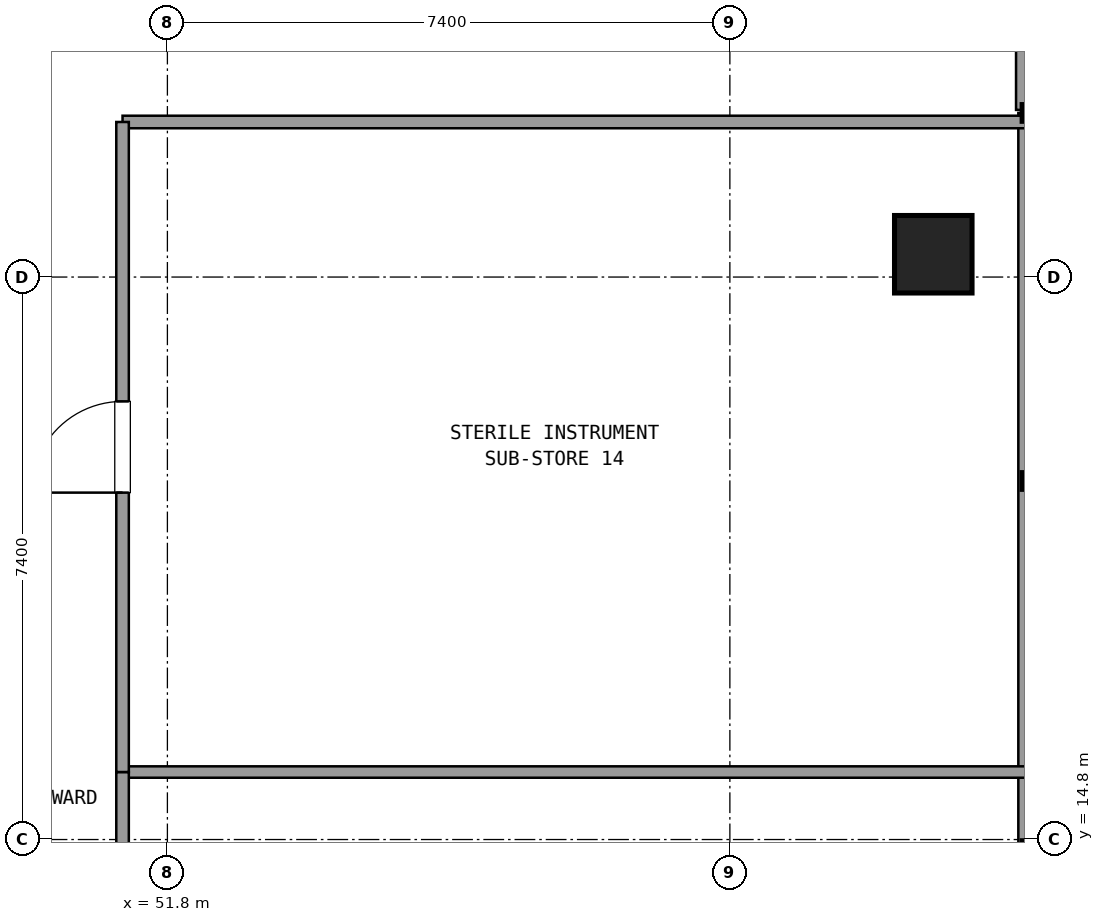
"""IFC4 building model, lengths in metres.
Left out: names, types, materials, properties, quantities, classifications, styles, units other than length and angle.
Written with IfcOpenShell. Run it as: python <this file> out.ifc"""

import sys

from ifc_helpers import new_model, si_unit, direction, frame, frame_2d, origin, origin_2d, place, context, subcontext, project, spatial, rectangle, extrude, element, fill, save


model = new_model("IFC4")
c1 = context("Model", 3, precision=1e-05, world=origin(), true_north=direction((0.0, 1.0)))
c2 = subcontext(c1, "Body", "Model", "MODEL_VIEW")
j1 = project(units=[si_unit("LENGTHUNIT", "METRE"), si_unit("PLANEANGLEUNIT", "RADIAN")], contexts=[c1])
p1 = place(None, origin())
s1 = spatial("IfcSite", under=j1, at=p1, CompositionType="ELEMENT")
p2 = place(p1, origin())
s2 = spatial("IfcBuilding", under=s1, at=p2, CompositionType="ELEMENT")
p3 = place(p2, frame((0.0, 0.0, 95.58)))
s3 = spatial("IfcBuildingStorey", under=s2, at=p3, CompositionType="ELEMENT", Elevation=95.58)
p4 = place(p3, frame((61.876, 22.5, 0.021), z_axis=(-0.084850379912, 0.0, 0.996393703828), x_axis=(0.0, -1.0, 0.0)))
e1 = element("IfcColumn", 1, at=p4, inside=s3, PredefinedType="COLUMN", context=c2, shape_type="SweptSolid", body=[
    extrude(rectangle(XDim=1.02, YDim=1.02, at=origin_2d()), origin(), (0.0, 0.0, 1.0), 3.571),
])
p5 = place(p3, frame((63.115, 24.399, 0.0), z_axis=(0.0, 0.0, 1.0), x_axis=(0.0, 1.0, 0.0)))
e2 = element("IfcWall", 2, at=p5, inside=s3, PredefinedType="SOLIDWALL", context=c2, shape_type="SweptSolid", body=[
    extrude(rectangle(XDim=3.0, YDim=0.3, at=frame_2d((1.5, 0.0))), origin(), (0.0, 0.0, 1.0), 2.67),
])
p6 = place(p5, frame((0.9, 0.0, 0.0)))
e3 = element("IfcOpeningElement", 3, at=p6, cuts=e2, PredefinedType="OPENING", context=c2, shape_type="SweptSolid", body=[
    extrude(rectangle(XDim=1.2, YDim=2.2, at=frame_2d((0.6, 1.1))), frame((0.0, 0.16, 0.0), z_axis=(0.0, -1.0, 0.0), x_axis=(1.0, 0.0, 0.0)), (0.0, 0.0, 1.0), 0.32),
])
p7 = place(p3, frame((63.115, 9.832, 0.0), z_axis=(0.0, 0.0, 1.0), x_axis=(0.0, 1.0, 0.0)))
e4 = element("IfcWall", 4, at=p7, inside=s3, PredefinedType="SOLIDWALL", context=c2, shape_type="SweptSolid", body=[
    extrude(rectangle(XDim=14.527, YDim=0.24, at=frame_2d((7.263, 0.0))), origin(), (0.0, 0.0, 1.0), 0.85),
])
p8 = place(p3, frame((51.21, 24.24, 0.0), z_axis=(0.0, 0.0, 1.0), x_axis=(1.0, 0.0, 0.0)))
e5 = element("IfcWall", 5, at=p8, inside=s3, PredefinedType="PARTITIONING", context=c2, shape_type="SweptSolid", body=[
    extrude(rectangle(XDim=11.886, YDim=0.165, at=frame_2d((5.943, 0.0))), origin(), (0.0, 0.0, 1.0), 2.61),
])
p9 = place(p3, frame((51.21, 15.688, 0.0), z_axis=(0.0, 0.0, 1.0), x_axis=(1.0, 0.0, 0.0)))
e6 = element("IfcWall", 6, at=p9, inside=s3, PredefinedType="PARTITIONING", context=c2, shape_type="SweptSolid", body=[
    extrude(rectangle(XDim=11.886, YDim=0.15, at=frame_2d((5.943, 0.0))), origin(), (0.0, 0.0, 1.0), 2.61),
])
p10 = place(p3, frame((51.21, 3.877, 0.0), z_axis=(0.0, 0.0, 1.0), x_axis=(0.0, 1.0, 0.0)))
e7 = element("IfcWall", 7, at=p10, inside=s3, PredefinedType="PARTITIONING", context=c2, shape_type="SweptSolid", body=[
    extrude(rectangle(XDim=11.811, YDim=0.165, at=frame_2d((5.906, 0.0))), origin(), (0.0, 0.0, 1.0), 2.61),
])
p11 = place(p10, frame((5.306, 0.0, 0.0)))
e8 = element("IfcOpeningElement", 8, at=p11, cuts=e7, PredefinedType="OPENING", context=c2, shape_type="SweptSolid", body=[
    extrude(rectangle(XDim=1.2, YDim=2.15, at=frame_2d((0.6, 1.075))), frame((0.0, 0.093, 0.0), z_axis=(0.0, -1.0, 0.0), x_axis=(1.0, 0.0, 0.0)), (0.0, 0.0, 1.0), 0.185),
])
p12 = place(p3, frame((51.21, 15.688, 0.0), z_axis=(0.0, 0.0, 1.0), x_axis=(0.0, 1.0, 0.0)))
e9 = element("IfcWall", 9, at=p12, inside=s3, PredefinedType="PARTITIONING", context=c2, shape_type="SweptSolid", body=[
    extrude(rectangle(XDim=8.552, YDim=0.165, at=frame_2d((4.276, 0.0))), origin(), (0.0, 0.0, 1.0), 2.61),
])
p13 = place(p12, frame((3.676, 0.0, 0.0)))
e10 = element("IfcOpeningElement", 10, at=p13, cuts=e9, PredefinedType="OPENING", context=c2, shape_type="SweptSolid", body=[
    extrude(rectangle(XDim=1.2, YDim=2.15, at=frame_2d((0.6, 1.075))), frame((0.0, 0.093, 0.0), z_axis=(0.0, -1.0, 0.0), x_axis=(1.0, 0.0, 0.0)), (0.0, 0.0, 1.0), 0.185),
])
p14 = place(p13, origin())
e11 = element("IfcDoor", 11, at=p14, inside=s3, OperationType="SINGLE_SWING_LEFT", PredefinedType="DOOR", context=c2, shape_type="SweptSolid", body=[
    extrude(rectangle(XDim=1.2, YDim=2.15, at=frame_2d((0.6, 1.075))), frame((0.0, 0.025, 0.0), z_axis=(0.0, -1.0, 0.0), x_axis=(1.0, 0.0, 0.0)), (0.0, 0.0, 1.0), 0.05),
])
fill(e10, e11)
save(model, sys.argv[1])
